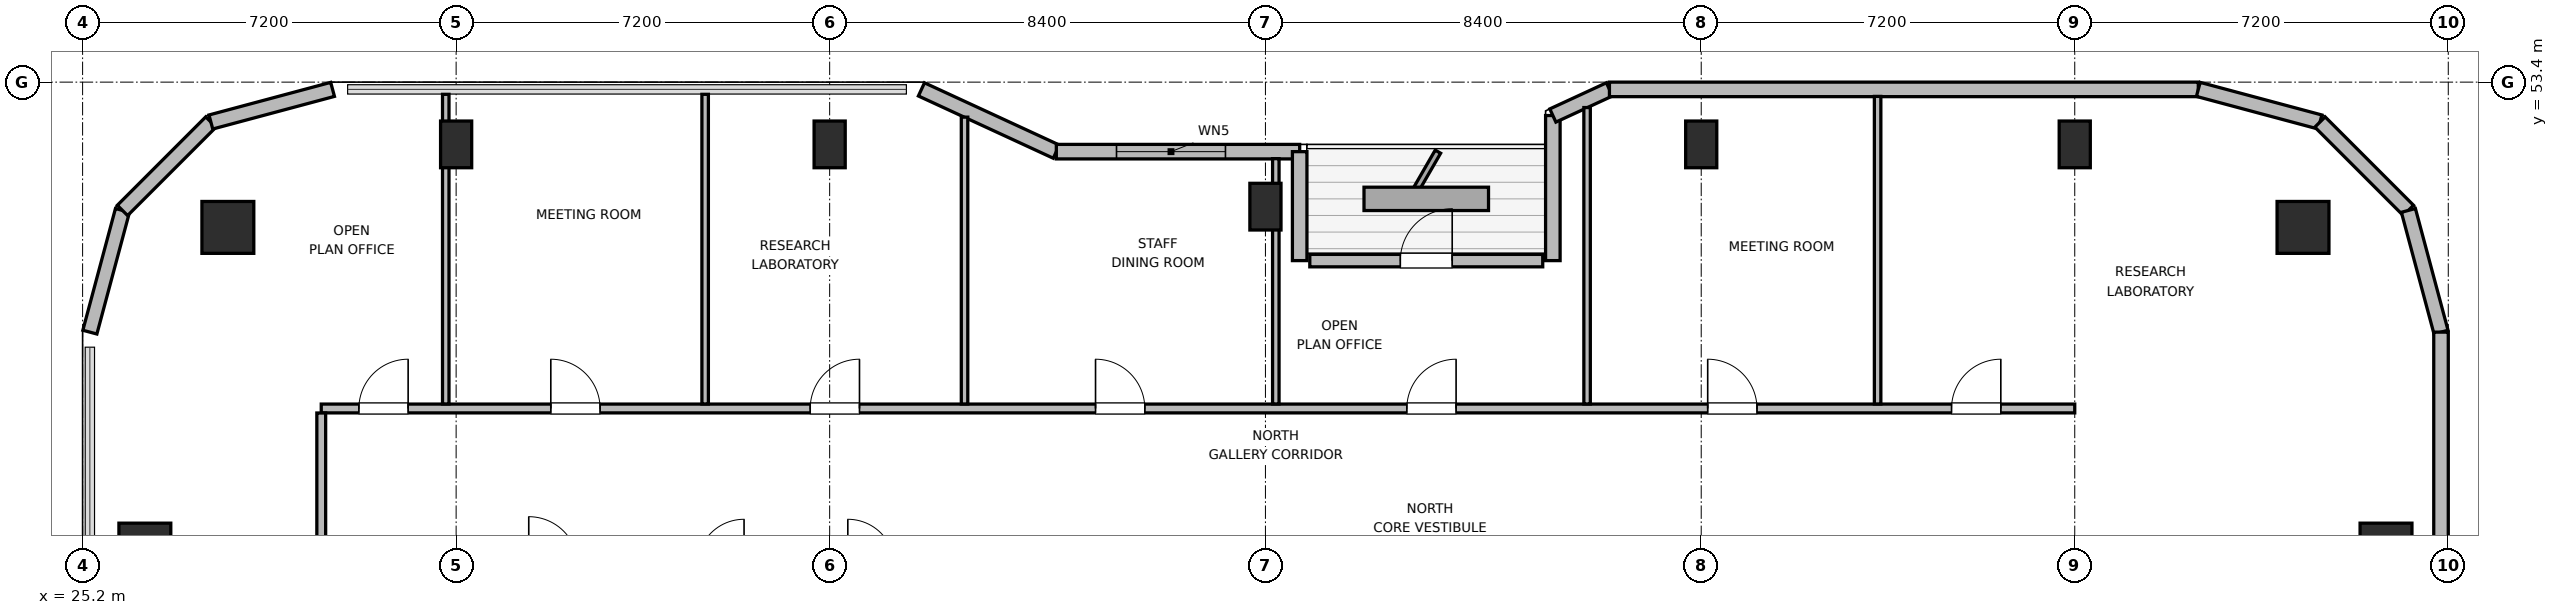
"""IFC4 building model, lengths in metres.
Left out: names, types, materials, properties, quantities, classifications, styles, units other than length and angle.
Written with IfcOpenShell. Run it as: python <this file> out.ifc"""

import sys

from ifc_helpers import new_model, si_unit, direction, frame, frame_2d, origin, origin_2d, place, context, subcontext, project, spatial, rectangle, circle, extrude, element, fill, save


model = new_model("IFC4")
c1 = context("Model", 3, precision=1e-05, world=origin(), true_north=direction((0.0, 1.0)))
c2 = subcontext(c1, "Body", "Model", "MODEL_VIEW")
j1 = project(units=[si_unit("LENGTHUNIT", "METRE"), si_unit("PLANEANGLEUNIT", "RADIAN")], contexts=[c1])
p1 = place(None, origin())
s1 = spatial("IfcSite", under=j1, at=p1, CompositionType="ELEMENT")
p2 = place(p1, origin())
s2 = spatial("IfcBuilding", under=s1, at=p2, CompositionType="ELEMENT")
p3 = place(p2, frame((0.0, 0.0, 258.9)))
s3 = spatial("IfcBuildingStorey", under=s2, at=p3, CompositionType="ELEMENT", Elevation=258.9)
for number, where, z_axis, x_axis in (
    (1, (68.0, 50.6, 0.0), (0.0, 0.0, 1.0), (1.0, 0.0, 0.0)),
    (2, (28.0, 50.6, 0.0), (0.0, 0.0, 1.0), (1.0, 0.0, 0.0)),
):
    element("IfcColumn", number, at=place(p3, frame(where, z_axis=z_axis, x_axis=x_axis)), inside=s3, PredefinedType="COLUMN", context=c2, shape_type="SweptSolid", body=[
        extrude(circle(Radius=0.5, at=origin_2d()), origin(), (0.0, 0.0, 1.0), 3.9),
    ])
for number, where, z_axis, x_axis in (
    (3, (32.4, 52.2, 0.0), (0.0, 0.0, 1.0), (1.0, 0.0, 0.0)),
    (4, (39.6, 52.2, 0.0), (0.0, 0.0, 1.0), (1.0, 0.0, 0.0)),
    (5, (48.0, 51.0, 0.0), (0.0, 0.0, 1.0), (1.0, 0.0, 0.0)),
    (6, (56.4, 52.2, 0.0), (0.0, 0.0, 1.0), (1.0, 0.0, 0.0)),
    (7, (63.6, 52.2, 0.0), (0.0, 0.0, 1.0), (1.0, 0.0, 0.0)),
):
    element("IfcColumn", number, at=place(p3, frame(where, z_axis=z_axis, x_axis=x_axis)), inside=s3, PredefinedType="COLUMN", context=c2, shape_type="SweptSolid", body=[
        extrude(rectangle(XDim=0.6, YDim=0.9, at=origin_2d()), origin(), (0.0, 0.0, 1.0), 3.9),
    ])
for number, where, z_axis, x_axis in (
    (8, (26.4, 44.4, 0.0), (0.0, 0.0, 1.0), (1.0, 0.0, 0.0)),
    (9, (69.6, 44.4, 0.0), (0.0, 0.0, 1.0), (1.0, 0.0, 0.0)),
):
    element("IfcColumn", number, at=place(p3, frame(where, z_axis=z_axis, x_axis=x_axis)), inside=s3, PredefinedType="COLUMN", context=c2, shape_type="SweptSolid", body=[
        extrude(rectangle(XDim=1.0, YDim=1.0, at=origin_2d()), origin(), (0.0, 0.0, 1.0), 3.9),
    ])
p4 = place(p3, frame((25.34, 48.582, 0.0), z_axis=(0.0, 0.0, 1.0), x_axis=(0.258751159445, 0.965944013639, 0.0)))
e10 = element("IfcWall", 10, at=p4, inside=s3, PredefinedType="SOLIDWALL", context=c2, shape_type="SweptSolid", body=[
    extrude(rectangle(XDim=2.429, YDim=0.28, at=frame_2d((1.214, 0.0))), origin(), (0.0, 0.0, 1.0), 3.68),
])
p5 = place(p3, frame((25.969, 50.927, 0.0), z_axis=(0.0, 0.0, 1.0), x_axis=(0.707106781187, 0.707106781187, 0.0)))
e11 = element("IfcWall", 11, at=p5, inside=s3, PredefinedType="SOLIDWALL", context=c2, shape_type="SweptSolid", body=[
    extrude(rectangle(XDim=2.41, YDim=0.28, at=frame_2d((1.205, 0.0))), origin(), (0.0, 0.0, 1.0), 3.68),
])
p6 = place(p3, frame((27.673, 52.632, 0.0), z_axis=(0.0, 0.0, 1.0), x_axis=(0.965937282298, 0.25877628691, 0.0)))
e12 = element("IfcWall", 12, at=p6, inside=s3, PredefinedType="SOLIDWALL", context=c2, shape_type="SweptSolid", body=[
    extrude(rectangle(XDim=2.428, YDim=0.28, at=frame_2d((1.214, 0.0))), origin(), (0.0, 0.0, 1.0), 3.68),
])
p7 = place(p3, frame((41.369, 53.26, 0.0), z_axis=(0.0, 0.0, 1.0), x_axis=(0.907956889006, -0.419063584324, 0.0)))
e13 = element("IfcWall", 13, at=p7, inside=s3, PredefinedType="SOLIDWALL", context=c2, shape_type="SweptSolid", body=[
    extrude(rectangle(XDim=2.864, YDim=0.28, at=frame_2d((1.432, 0.0))), origin(), (0.0, 0.0, 1.0), 2.265),
])
p8 = place(p3, frame((43.969, 52.06, 0.0), z_axis=(0.0, 0.0, 1.0), x_axis=(1.0, 0.0, 0.0)))
e14 = element("IfcWall", 14, at=p8, inside=s3, PredefinedType="SOLIDWALL", context=c2, shape_type="SweptSolid", body=[
    extrude(rectangle(XDim=4.691, YDim=0.28, at=frame_2d((2.345, 0.0))), origin(), (0.0, 0.0, 1.0), 2.265),
])
p9 = place(p8, frame((1.16, 0.0, 0.85)))
e15 = element("IfcOpeningElement", 15, at=p9, cuts=e14, PredefinedType="OPENING", context=c2, shape_type="SweptSolid", body=[
    extrude(rectangle(XDim=2.1, YDim=1.05, at=frame_2d((1.05, 0.525))), frame((0.0, 0.15, 0.0), z_axis=(0.0, -1.0, 0.0), x_axis=(1.0, 0.0, 0.0)), (0.0, 0.0, 1.0), 0.3),
])
p10 = place(p3, frame((48.66, 52.06, 0.0), z_axis=(0.0, 0.0, 1.0), x_axis=(0.0, -1.0, 0.0)))
e16 = element("IfcWall", 16, at=p10, inside=s3, PredefinedType="SOLIDWALL", context=c2, shape_type="SweptSolid", body=[
    extrude(rectangle(XDim=2.1, YDim=0.28, at=frame_2d((1.05, 0.0))), origin(), (0.0, 0.0, 1.0), 2.265),
])
p11 = place(p3, frame((48.855, 49.96, 0.0), z_axis=(0.0, 0.0, 1.0), x_axis=(1.0, 0.0, 0.0)))
e17 = element("IfcWall", 17, at=p11, inside=s3, PredefinedType="SOLIDWALL", context=c2, shape_type="SweptSolid", body=[
    extrude(rectangle(XDim=4.49, YDim=0.24, at=frame_2d((2.245, 0.0))), origin(), (0.0, 0.0, 1.0), 3.68),
])
p12 = place(p11, frame((1.745, 0.0, 0.0)))
e18 = element("IfcOpeningElement", 18, at=p12, cuts=e17, PredefinedType="OPENING", context=c2, shape_type="SweptSolid", body=[
    extrude(rectangle(XDim=1.0, YDim=2.02, at=frame_2d((0.5, 1.01))), frame((0.0, 0.13, 0.0), z_axis=(0.0, -1.0, 0.0), x_axis=(1.0, 0.0, 0.0)), (0.0, 0.0, 1.0), 0.26),
])
p13 = place(p3, frame((53.54, 49.96, 0.0), z_axis=(0.0, 0.0, 1.0), x_axis=(0.0, 1.0, 0.0)))
e19 = element("IfcWall", 19, at=p13, inside=s3, PredefinedType="SOLIDWALL", context=c2, shape_type="SweptSolid", body=[
    extrude(rectangle(XDim=2.796, YDim=0.28, at=frame_2d((1.398, 0.0))), origin(), (0.0, 0.0, 1.0), 2.265),
])
p14 = place(p3, frame((53.54, 52.756, 0.0), z_axis=(0.0, 0.0, 1.0), x_axis=(0.907893953211, 0.419199916176, 0.0)))
e20 = element("IfcWall", 20, at=p14, inside=s3, PredefinedType="SOLIDWALL", context=c2, shape_type="SweptSolid", body=[
    extrude(rectangle(XDim=1.201, YDim=0.28, at=frame_2d((0.601, 0.0))), origin(), (0.0, 0.0, 1.0), 3.68),
])
p15 = place(p3, frame((54.631, 53.26, 0.0), z_axis=(0.0, 0.0, 1.0), x_axis=(1.0, 0.0, 0.0)))
e21 = element("IfcWall", 21, at=p15, inside=s3, PredefinedType="SOLIDWALL", context=c2, shape_type="SweptSolid", body=[
    extrude(rectangle(XDim=11.351, YDim=0.28, at=frame_2d((5.675, 0.0))), origin(), (0.0, 0.0, 1.0), 3.68),
])
p16 = place(p3, frame((65.982, 53.26, 0.0), z_axis=(0.0, 0.0, 1.0), x_axis=(0.965937282298, -0.25877628691, 0.0)))
e22 = element("IfcWall", 22, at=p16, inside=s3, PredefinedType="SOLIDWALL", context=c2, shape_type="SweptSolid", body=[
    extrude(rectangle(XDim=2.428, YDim=0.28, at=frame_2d((1.214, 0.0))), origin(), (0.0, 0.0, 1.0), 3.68),
])
p17 = place(p3, frame((68.327, 52.632, 0.0), z_axis=(0.0, 0.0, 1.0), x_axis=(0.707106781187, -0.707106781187, 0.0)))
e23 = element("IfcWall", 23, at=p17, inside=s3, PredefinedType="SOLIDWALL", context=c2, shape_type="SweptSolid", body=[
    extrude(rectangle(XDim=2.41, YDim=0.28, at=frame_2d((1.205, 0.0))), origin(), (0.0, 0.0, 1.0), 3.68),
])
p18 = place(p3, frame((70.031, 50.927, 0.0), z_axis=(0.0, 0.0, 1.0), x_axis=(0.258751159445, -0.965944013639, 0.0)))
e24 = element("IfcWall", 24, at=p18, inside=s3, PredefinedType="SOLIDWALL", context=c2, shape_type="SweptSolid", body=[
    extrude(rectangle(XDim=2.429, YDim=0.28, at=frame_2d((1.214, 0.0))), origin(), (0.0, 0.0, 1.0), 3.68),
])
p19 = place(p3, frame((70.66, 48.582, 0.0), z_axis=(0.0, 0.0, 1.0), x_axis=(0.0, -1.0, 0.0)))
e25 = element("IfcWall", 25, at=p19, inside=s3, PredefinedType="SOLIDWALL", context=c2, shape_type="SweptSolid", body=[
    extrude(rectangle(XDim=5.842, YDim=0.28, at=frame_2d((2.921, 0.0))), origin(), (0.0, 0.0, 1.0), 3.68),
])
p20 = place(p3, frame((29.8, 47.11, 0.0), z_axis=(0.0, 0.0, 1.0), x_axis=(1.0, 0.0, 0.0)))
e26 = element("IfcWall", 26, at=p20, inside=s3, PredefinedType="PARTITIONING", context=c2, shape_type="SweptSolid", body=[
    extrude(rectangle(XDim=33.8, YDim=0.17, at=frame_2d((16.9, 0.0))), origin(), (0.0, 0.0, 1.0), 3.68),
])
p21 = place(p20, frame((0.725, 0.0, 0.0)))
e27 = element("IfcOpeningElement", 27, at=p21, cuts=e26, PredefinedType="OPENING", context=c2, shape_type="SweptSolid", body=[
    extrude(rectangle(XDim=0.95, YDim=2.04, at=frame_2d((0.475, 1.02))), frame((0.0, 0.095, 0.0), z_axis=(0.0, -1.0, 0.0), x_axis=(1.0, 0.0, 0.0)), (0.0, 0.0, 1.0), 0.19),
])
p22 = place(p20, frame((4.425, 0.0, 0.0)))
e28 = element("IfcOpeningElement", 28, at=p22, cuts=e26, PredefinedType="OPENING", context=c2, shape_type="SweptSolid", body=[
    extrude(rectangle(XDim=0.95, YDim=2.04, at=frame_2d((0.475, 1.02))), frame((0.0, 0.095, 0.0), z_axis=(0.0, -1.0, 0.0), x_axis=(1.0, 0.0, 0.0)), (0.0, 0.0, 1.0), 0.19),
])
p23 = place(p20, frame((9.425, 0.0, 0.0)))
e29 = element("IfcOpeningElement", 29, at=p23, cuts=e26, PredefinedType="OPENING", context=c2, shape_type="SweptSolid", body=[
    extrude(rectangle(XDim=0.95, YDim=2.04, at=frame_2d((0.475, 1.02))), frame((0.0, 0.095, 0.0), z_axis=(0.0, -1.0, 0.0), x_axis=(1.0, 0.0, 0.0)), (0.0, 0.0, 1.0), 0.19),
])
p24 = place(p20, frame((14.925, 0.0, 0.0)))
e30 = element("IfcOpeningElement", 30, at=p24, cuts=e26, PredefinedType="OPENING", context=c2, shape_type="SweptSolid", body=[
    extrude(rectangle(XDim=0.95, YDim=2.04, at=frame_2d((0.475, 1.02))), frame((0.0, 0.095, 0.0), z_axis=(0.0, -1.0, 0.0), x_axis=(1.0, 0.0, 0.0)), (0.0, 0.0, 1.0), 0.19),
])
p25 = place(p20, frame((20.925, 0.0, 0.0)))
e31 = element("IfcOpeningElement", 31, at=p25, cuts=e26, PredefinedType="OPENING", context=c2, shape_type="SweptSolid", body=[
    extrude(rectangle(XDim=0.95, YDim=2.04, at=frame_2d((0.475, 1.02))), frame((0.0, 0.095, 0.0), z_axis=(0.0, -1.0, 0.0), x_axis=(1.0, 0.0, 0.0)), (0.0, 0.0, 1.0), 0.19),
])
p26 = place(p20, frame((26.725, 0.0, 0.0)))
e32 = element("IfcOpeningElement", 32, at=p26, cuts=e26, PredefinedType="OPENING", context=c2, shape_type="SweptSolid", body=[
    extrude(rectangle(XDim=0.95, YDim=2.04, at=frame_2d((0.475, 1.02))), frame((0.0, 0.095, 0.0), z_axis=(0.0, -1.0, 0.0), x_axis=(1.0, 0.0, 0.0)), (0.0, 0.0, 1.0), 0.19),
])
p27 = place(p20, frame((31.425, 0.0, 0.0)))
e33 = element("IfcOpeningElement", 33, at=p27, cuts=e26, PredefinedType="OPENING", context=c2, shape_type="SweptSolid", body=[
    extrude(rectangle(XDim=0.95, YDim=2.04, at=frame_2d((0.475, 1.02))), frame((0.0, 0.095, 0.0), z_axis=(0.0, -1.0, 0.0), x_axis=(1.0, 0.0, 0.0)), (0.0, 0.0, 1.0), 0.19),
])
p28 = place(p3, frame((29.8, 24.977, 0.0), z_axis=(0.0, 0.0, 1.0), x_axis=(0.0, 1.0, 0.0)))
e34 = element("IfcWall", 34, at=p28, inside=s3, PredefinedType="PARTITIONING", context=c2, shape_type="SweptSolid", body=[
    extrude(rectangle(XDim=22.046, YDim=0.17, at=frame_2d((11.023, 0.0))), origin(), (0.0, 0.0, 1.0), 3.68),
])
p29 = place(p28, frame((3.693, 0.0, 0.0)))
e35 = element("IfcOpeningElement", 35, at=p29, cuts=e34, PredefinedType="OPENING", context=c2, shape_type="SweptSolid", body=[
    extrude(rectangle(XDim=0.95, YDim=2.04, at=frame_2d((0.475, 1.02))), frame((0.0, 0.095, 0.0), z_axis=(0.0, -1.0, 0.0), x_axis=(1.0, 0.0, 0.0)), (0.0, 0.0, 1.0), 0.19),
])
p30 = place(p28, frame((11.148, 0.0, 0.0)))
e36 = element("IfcOpeningElement", 36, at=p30, cuts=e34, PredefinedType="OPENING", context=c2, shape_type="SweptSolid", body=[
    extrude(rectangle(XDim=0.95, YDim=2.04, at=frame_2d((0.475, 1.02))), frame((0.0, 0.095, 0.0), z_axis=(0.0, -1.0, 0.0), x_axis=(1.0, 0.0, 0.0)), (0.0, 0.0, 1.0), 0.19),
])
p31 = place(p28, frame((18.003, 0.0, 0.0)))
e37 = element("IfcOpeningElement", 37, at=p31, cuts=e34, PredefinedType="OPENING", context=c2, shape_type="SweptSolid", body=[
    extrude(rectangle(XDim=0.95, YDim=2.04, at=frame_2d((0.475, 1.02))), frame((0.0, 0.095, 0.0), z_axis=(0.0, -1.0, 0.0), x_axis=(1.0, 0.0, 0.0)), (0.0, 0.0, 1.0), 0.19),
])
p32 = place(p3, frame((32.2, 47.197, 0.0), z_axis=(0.0, 0.0, 1.0), x_axis=(0.0, 1.0, 0.0)))
e38 = element("IfcWall", 38, at=p32, inside=s3, PredefinedType="PARTITIONING", context=c2, shape_type="SweptSolid", body=[
    extrude(rectangle(XDim=5.968, YDim=0.125, at=frame_2d((2.984, 0.0))), origin(), (0.0, 0.0, 1.0), 3.054),
])
p33 = place(p3, frame((37.2, 47.197, 0.0), z_axis=(0.0, 0.0, 1.0), x_axis=(0.0, 1.0, 0.0)))
e39 = element("IfcWall", 39, at=p33, inside=s3, PredefinedType="PARTITIONING", context=c2, shape_type="SweptSolid", body=[
    extrude(rectangle(XDim=5.968, YDim=0.125, at=frame_2d((2.984, 0.0))), origin(), (0.0, 0.0, 1.0), 3.68),
])
p34 = place(p3, frame((42.2, 47.197, 0.0), z_axis=(0.0, 0.0, 1.0), x_axis=(0.0, 1.0, 0.0)))
e40 = element("IfcWall", 40, at=p34, inside=s3, PredefinedType="PARTITIONING", context=c2, shape_type="SweptSolid", body=[
    extrude(rectangle(XDim=5.528, YDim=0.125, at=frame_2d((2.764, 0.0))), origin(), (0.0, 0.0, 1.0), 3.043),
])
p35 = place(p3, frame((48.2, 47.197, 0.0), z_axis=(0.0, 0.0, 1.0), x_axis=(0.0, 1.0, 0.0)))
e41 = element("IfcWall", 41, at=p35, inside=s3, PredefinedType="PARTITIONING", context=c2, shape_type="SweptSolid", body=[
    extrude(rectangle(XDim=4.728, YDim=0.125, at=frame_2d((2.364, 0.0))), origin(), (0.0, 0.0, 1.0), 3.054),
])
p36 = place(p3, frame((54.2, 47.197, 0.0), z_axis=(0.0, 0.0, 1.0), x_axis=(0.0, 1.0, 0.0)))
e42 = element("IfcWall", 42, at=p36, inside=s3, PredefinedType="PARTITIONING", context=c2, shape_type="SweptSolid", body=[
    extrude(rectangle(XDim=5.713, YDim=0.125, at=frame_2d((2.856, 0.0))), origin(), (0.0, 0.0, 1.0), 3.043),
])
p37 = place(p3, frame((59.8, 47.197, 0.0), z_axis=(0.0, 0.0, 1.0), x_axis=(0.0, 1.0, 0.0)))
e43 = element("IfcWall", 43, at=p37, inside=s3, PredefinedType="PARTITIONING", context=c2, shape_type="SweptSolid", body=[
    extrude(rectangle(XDim=5.928, YDim=0.125, at=frame_2d((2.964, 0.0))), origin(), (0.0, 0.0, 1.0), 3.68),
])
p38 = place(p9, origin())
e44 = element("IfcWindow", 44, at=p38, inside=s3, PartitioningType="SINGLE_PANEL", PredefinedType="WINDOW", context=c2, shape_type="SweptSolid", body=[
    extrude(rectangle(XDim=2.1, YDim=1.05, at=frame_2d((1.05, 0.525))), frame((0.0, 0.03, 0.0), z_axis=(0.0, -1.0, 0.0), x_axis=(1.0, 0.0, 0.0)), (0.0, 0.0, 1.0), 0.06),
])
fill(e15, e44)
p39 = place(p12, origin())
e45 = element("IfcDoor", 45, at=p39, inside=s3, OperationType="SINGLE_SWING_RIGHT", PredefinedType="DOOR", context=c2, shape_type="SweptSolid", body=[
    extrude(rectangle(XDim=1.0, YDim=2.02, at=frame_2d((0.5, 1.01))), frame((0.0, 0.025, 0.0), z_axis=(0.0, -1.0, 0.0), x_axis=(1.0, 0.0, 0.0)), (0.0, 0.0, 1.0), 0.05),
])
fill(e18, e45)
p40 = place(p21, origin())
e46 = element("IfcDoor", 46, at=p40, inside=s3, OperationType="SINGLE_SWING_RIGHT", PredefinedType="DOOR", context=c2, shape_type="SweptSolid", body=[
    extrude(rectangle(XDim=0.95, YDim=2.04, at=frame_2d((0.475, 1.02))), frame((0.0, 0.025, 0.0), z_axis=(0.0, -1.0, 0.0), x_axis=(1.0, 0.0, 0.0)), (0.0, 0.0, 1.0), 0.05),
])
fill(e27, e46)
p41 = place(p22, origin())
e47 = element("IfcDoor", 47, at=p41, inside=s3, OperationType="SINGLE_SWING_LEFT", PredefinedType="DOOR", context=c2, shape_type="SweptSolid", body=[
    extrude(rectangle(XDim=0.95, YDim=2.04, at=frame_2d((0.475, 1.02))), frame((0.0, 0.025, 0.0), z_axis=(0.0, -1.0, 0.0), x_axis=(1.0, 0.0, 0.0)), (0.0, 0.0, 1.0), 0.05),
])
fill(e28, e47)
p42 = place(p23, origin())
e48 = element("IfcDoor", 48, at=p42, inside=s3, OperationType="SINGLE_SWING_RIGHT", PredefinedType="DOOR", context=c2, shape_type="SweptSolid", body=[
    extrude(rectangle(XDim=0.95, YDim=2.04, at=frame_2d((0.475, 1.02))), frame((0.0, 0.025, 0.0), z_axis=(0.0, -1.0, 0.0), x_axis=(1.0, 0.0, 0.0)), (0.0, 0.0, 1.0), 0.05),
])
fill(e29, e48)
p43 = place(p24, origin())
e49 = element("IfcDoor", 49, at=p43, inside=s3, OperationType="SINGLE_SWING_LEFT", PredefinedType="DOOR", context=c2, shape_type="SweptSolid", body=[
    extrude(rectangle(XDim=0.95, YDim=2.04, at=frame_2d((0.475, 1.02))), frame((0.0, 0.025, 0.0), z_axis=(0.0, -1.0, 0.0), x_axis=(1.0, 0.0, 0.0)), (0.0, 0.0, 1.0), 0.05),
])
fill(e30, e49)
p44 = place(p25, origin())
e50 = element("IfcDoor", 50, at=p44, inside=s3, OperationType="SINGLE_SWING_RIGHT", PredefinedType="DOOR", context=c2, shape_type="SweptSolid", body=[
    extrude(rectangle(XDim=0.95, YDim=2.04, at=frame_2d((0.475, 1.02))), frame((0.0, 0.025, 0.0), z_axis=(0.0, -1.0, 0.0), x_axis=(1.0, 0.0, 0.0)), (0.0, 0.0, 1.0), 0.05),
])
fill(e31, e50)
p45 = place(p26, origin())
e51 = element("IfcDoor", 51, at=p45, inside=s3, OperationType="SINGLE_SWING_LEFT", PredefinedType="DOOR", context=c2, shape_type="SweptSolid", body=[
    extrude(rectangle(XDim=0.95, YDim=2.04, at=frame_2d((0.475, 1.02))), frame((0.0, 0.025, 0.0), z_axis=(0.0, -1.0, 0.0), x_axis=(1.0, 0.0, 0.0)), (0.0, 0.0, 1.0), 0.05),
])
fill(e32, e51)
p46 = place(p27, origin())
e52 = element("IfcDoor", 52, at=p46, inside=s3, OperationType="SINGLE_SWING_RIGHT", PredefinedType="DOOR", context=c2, shape_type="SweptSolid", body=[
    extrude(rectangle(XDim=0.95, YDim=2.04, at=frame_2d((0.475, 1.02))), frame((0.0, 0.025, 0.0), z_axis=(0.0, -1.0, 0.0), x_axis=(1.0, 0.0, 0.0)), (0.0, 0.0, 1.0), 0.05),
])
fill(e33, e52)
save(model, sys.argv[1])
